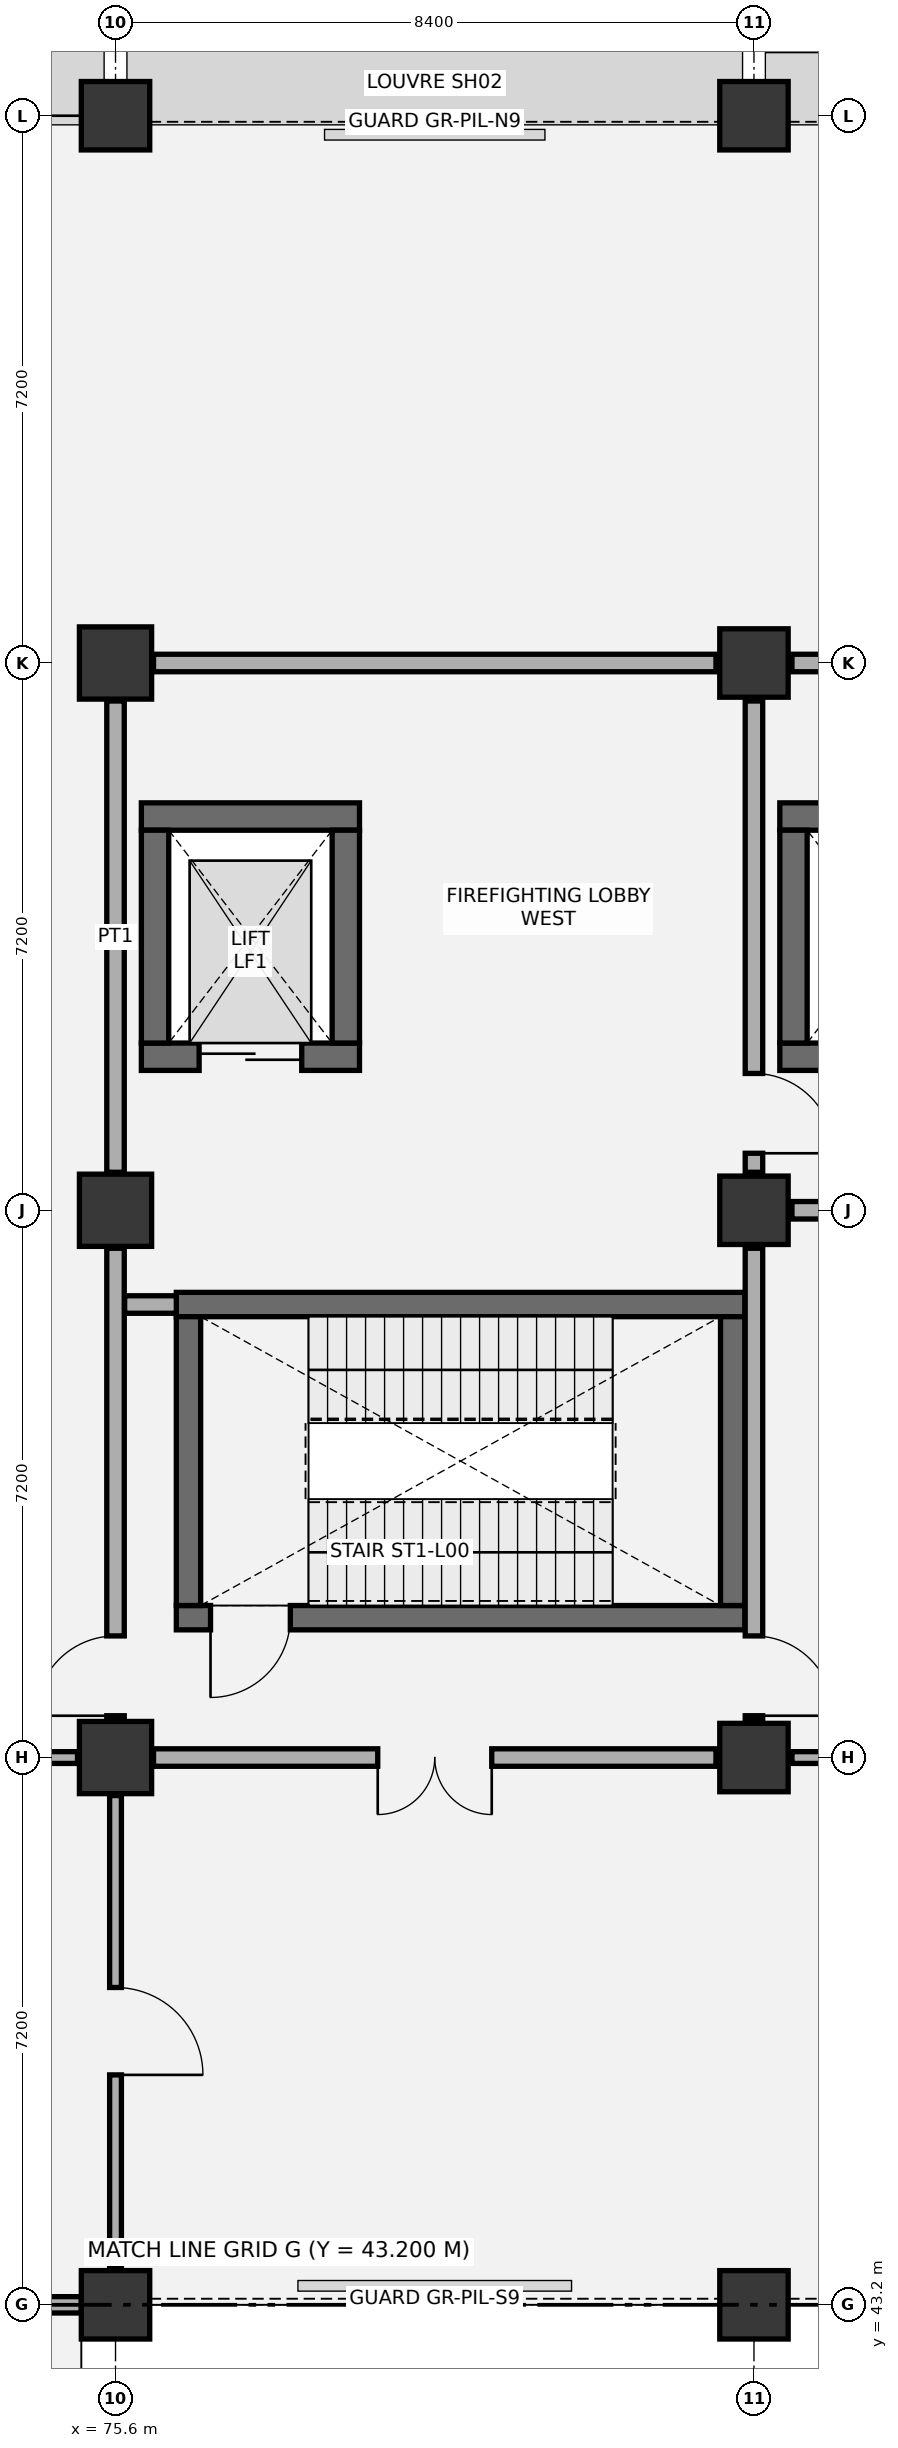
"""IFC4 building model, lengths in metres.
Left out: names, types, materials, properties, quantities, classifications, styles, units other than length and angle.
Written with IfcOpenShell. Run it as: python <this file> out.ifc"""

import sys

from ifc_helpers import new_model, si_unit, direction, frame, frame_2d, origin, origin_2d, place, context, subcontext, project, spatial, rectangle, circle, extrude, element, fill, save


model = new_model("IFC4")
c1 = context("Model", 3, precision=1e-05, world=origin(), true_north=direction((0.0, 1.0)))
c2 = subcontext(c1, "Body", "Model", "MODEL_VIEW")
j1 = project(units=[si_unit("LENGTHUNIT", "METRE"), si_unit("PLANEANGLEUNIT", "RADIAN")], contexts=[c1])
p1 = place(None, origin())
s1 = spatial("IfcSite", under=j1, at=p1, CompositionType="ELEMENT")
p2 = place(p1, origin())
s2 = spatial("IfcBuilding", under=s1, at=p2, CompositionType="ELEMENT")
p3 = place(p2, origin())
s3 = spatial("IfcBuildingStorey", under=s2, at=p3, CompositionType="ELEMENT", Elevation=0.0)
p4 = place(p3, frame((75.6, 43.2, 0.0), z_axis=(0.0, 0.0, 1.0), x_axis=(1.0, 0.0, 0.0)))
e1 = element("IfcColumn", 1, at=p4, inside=s3, PredefinedType="COLUMN", context=c2, shape_type="SweptSolid", body=[
    extrude(circle(Radius=0.45, at=origin_2d()), origin(), (0.0, 0.0, 1.0), 6.0),
])
for number, where, z_axis, x_axis in (
    (2, (75.6, 50.4, 0.0), (0.0, 0.0, 1.0), (1.0, 0.0, 0.0)),
    (3, (75.6, 57.6, 0.0), (0.0, 0.0, 1.0), (1.0, 0.0, 0.0)),
    (4, (75.6, 64.8, 0.0), (0.0, 0.0, 1.0), (1.0, 0.0, 0.0)),
):
    element("IfcColumn", number, at=place(p3, frame(where, z_axis=z_axis, x_axis=x_axis)), inside=s3, PredefinedType="COLUMN", context=c2, shape_type="SweptSolid", body=[
        extrude(rectangle(XDim=0.95, YDim=0.95, at=origin_2d()), origin(), (0.0, 0.0, 1.0), 6.0),
    ])
for number, where, z_axis, x_axis in (
    (5, (75.6, 72.0, 0.0), (0.0, 0.0, 1.0), (1.0, 0.0, 0.0)),
    (6, (84.0, 43.2, 0.0), (0.0, 0.0, 1.0), (1.0, 0.0, 0.0)),
):
    element("IfcColumn", number, at=place(p3, frame(where, z_axis=z_axis, x_axis=x_axis)), inside=s3, PredefinedType="COLUMN", context=c2, shape_type="SweptSolid", body=[
        extrude(circle(Radius=0.45, at=origin_2d()), origin(), (0.0, 0.0, 1.0), 6.0),
    ])
for number, where, z_axis, x_axis in (
    (7, (84.0, 50.4, 0.0), (0.0, 0.0, 1.0), (1.0, 0.0, 0.0)),
    (8, (84.0, 57.6, 0.0), (0.0, 0.0, 1.0), (1.0, 0.0, 0.0)),
    (9, (84.0, 64.8, 0.0), (0.0, 0.0, 1.0), (1.0, 0.0, 0.0)),
):
    element("IfcColumn", number, at=place(p3, frame(where, z_axis=z_axis, x_axis=x_axis)), inside=s3, PredefinedType="COLUMN", context=c2, shape_type="SweptSolid", body=[
        extrude(rectangle(XDim=0.9, YDim=0.9, at=origin_2d()), origin(), (0.0, 0.0, 1.0), 6.0),
    ])
p5 = place(p3, frame((84.0, 72.0, 0.0), z_axis=(0.0, 0.0, 1.0), x_axis=(1.0, 0.0, 0.0)))
e10 = element("IfcColumn", 10, at=p5, inside=s3, PredefinedType="COLUMN", context=c2, shape_type="SweptSolid", body=[
    extrude(circle(Radius=0.45, at=origin_2d()), origin(), (0.0, 0.0, 1.0), 6.0),
])
p6 = place(p3, frame((76.4, 52.24, 0.0), z_axis=(0.0, 0.0, 1.0), x_axis=(1.0, 0.0, 0.0)))
e11 = element("IfcWall", 11, at=p6, inside=s3, PredefinedType="SHEAR", context=c2, shape_type="SweptSolid", body=[
    extrude(rectangle(XDim=7.48, YDim=0.32, at=frame_2d((3.74, 0.0))), origin(), (0.0, 0.0, 1.0), 5.675),
])
p7 = place(p6, frame((0.45, 0.0, 0.0)))
e12 = element("IfcOpeningElement", 12, at=p7, cuts=e11, PredefinedType="OPENING", context=c2, shape_type="SweptSolid", body=[
    extrude(rectangle(XDim=1.05, YDim=2.15, at=frame_2d((0.525, 1.075))), frame((0.0, 0.17, 0.0), z_axis=(0.0, -1.0, 0.0), x_axis=(1.0, 0.0, 0.0)), (0.0, 0.0, 1.0), 0.34),
])
p8 = place(p3, frame((76.4, 56.36, 0.0), z_axis=(0.0, 0.0, 1.0), x_axis=(1.0, 0.0, 0.0)))
e13 = element("IfcWall", 13, at=p8, inside=s3, PredefinedType="SHEAR", context=c2, shape_type="SweptSolid", body=[
    extrude(rectangle(XDim=7.48, YDim=0.32, at=frame_2d((3.74, 0.0))), origin(), (0.0, 0.0, 1.0), 5.675),
])
for number, where, z_axis, x_axis in (
    (14, (76.56, 52.4, 0.0), (0.0, 0.0, 1.0), (0.0, 1.0, 0.0)),
    (15, (83.72, 52.4, 0.0), (0.0, 0.0, 1.0), (0.0, 1.0, 0.0)),
):
    element("IfcWall", number, at=place(p3, frame(where, z_axis=z_axis, x_axis=x_axis)), inside=s3, PredefinedType="SHEAR", context=c2, shape_type="SweptSolid", body=[
        extrude(rectangle(XDim=3.8, YDim=0.32, at=frame_2d((1.9, 0.0))), origin(), (0.0, 0.0, 1.0), 5.675),
    ])
p9 = place(p3, frame((75.94, 62.78, 0.0), z_axis=(0.0, 0.0, 1.0), x_axis=(1.0, 0.0, 0.0)))
e16 = element("IfcWall", 16, at=p9, inside=s3, PredefinedType="SHEAR", context=c2, shape_type="SweptSolid", body=[
    extrude(rectangle(XDim=2.87, YDim=0.36, at=frame_2d((1.435, 0.0))), origin(), (0.0, 0.0, 1.0), 5.675),
])
p10 = place(p3, frame((75.94, 59.62, 0.0), z_axis=(0.0, 0.0, 1.0), x_axis=(1.0, 0.0, 0.0)))
e17 = element("IfcWall", 17, at=p10, inside=s3, PredefinedType="SHEAR", context=c2, shape_type="SweptSolid", body=[
    extrude(rectangle(XDim=2.87, YDim=0.36, at=frame_2d((1.435, 0.0))), origin(), (0.0, 0.0, 1.0), 5.675),
])
p11 = place(p10, frame((0.76, 0.0, 0.0)))
e18 = element("IfcOpeningElement", 18, at=p11, cuts=e17, PredefinedType="OPENING", context=c2, shape_type="SweptSolid", body=[
    extrude(rectangle(XDim=1.35, YDim=2.2, at=frame_2d((0.675, 1.1))), frame((0.0, 0.19, 0.0), z_axis=(0.0, -1.0, 0.0), x_axis=(1.0, 0.0, 0.0)), (0.0, 0.0, 1.0), 0.38),
])
for number, where, z_axis, x_axis in (
    (19, (76.12, 59.8, 0.0), (0.0, 0.0, 1.0), (0.0, 1.0, 0.0)),
    (20, (78.63, 59.8, 0.0), (0.0, 0.0, 1.0), (0.0, 1.0, 0.0)),
):
    element("IfcWall", number, at=place(p3, frame(where, z_axis=z_axis, x_axis=x_axis)), inside=s3, PredefinedType="SHEAR", context=c2, shape_type="SweptSolid", body=[
        extrude(rectangle(XDim=2.8, YDim=0.36, at=frame_2d((1.4, 0.0))), origin(), (0.0, 0.0, 1.0), 5.675),
    ])
p12 = place(p3, frame((84.34, 62.78, 0.0), z_axis=(0.0, 0.0, 1.0), x_axis=(1.0, 0.0, 0.0)))
e21 = element("IfcWall", 21, at=p12, inside=s3, PredefinedType="SHEAR", context=c2, shape_type="SweptSolid", body=[
    extrude(rectangle(XDim=7.77, YDim=0.36, at=frame_2d((3.885, 0.0))), origin(), (0.0, 0.0, 1.0), 5.675),
])
p13 = place(p3, frame((84.34, 59.62, 0.0), z_axis=(0.0, 0.0, 1.0), x_axis=(1.0, 0.0, 0.0)))
e22 = element("IfcWall", 22, at=p13, inside=s3, PredefinedType="SHEAR", context=c2, shape_type="SweptSolid", body=[
    extrude(rectangle(XDim=2.66, YDim=0.36, at=frame_2d((1.33, 0.0))), origin(), (0.0, 0.0, 1.0), 5.675),
])
p14 = place(p13, frame((0.78, 0.0, 0.0)))
e23 = element("IfcOpeningElement", 23, at=p14, cuts=e22, PredefinedType="OPENING", context=c2, shape_type="SweptSolid", body=[
    extrude(rectangle(XDim=1.1, YDim=2.15, at=frame_2d((0.55, 1.075))), frame((0.0, 0.19, 0.0), z_axis=(0.0, -1.0, 0.0), x_axis=(1.0, 0.0, 0.0)), (0.0, 0.0, 1.0), 0.38),
])
p15 = place(p3, frame((84.52, 59.8, 0.0), z_axis=(0.0, 0.0, 1.0), x_axis=(0.0, 1.0, 0.0)))
e24 = element("IfcWall", 24, at=p15, inside=s3, PredefinedType="SHEAR", context=c2, shape_type="SweptSolid", body=[
    extrude(rectangle(XDim=2.8, YDim=0.36, at=frame_2d((1.4, 0.0))), origin(), (0.0, 0.0, 1.0), 5.675),
])
p16 = place(p3, frame((67.65, 43.2, 0.0), z_axis=(0.0, 0.0, 1.0), x_axis=(1.0, 0.0, 0.0)))
e25 = element("IfcWall", 25, at=p16, inside=s3, PredefinedType="SOLIDWALL", context=c2, shape_type="SweptSolid", body=[
    extrude(rectangle(XDim=7.5, YDim=0.215, at=frame_2d((3.75, 0.0))), origin(), (0.0, 0.0, 1.0), 5.02),
])
p17 = place(p16, frame((2.95, 0.0, 0.0)))
e26 = element("IfcOpeningElement", 26, at=p17, cuts=e25, PredefinedType="OPENING", context=c2, shape_type="SweptSolid", body=[
    extrude(rectangle(XDim=1.6, YDim=2.25, at=frame_2d((0.8, 1.125))), frame((0.0, 0.117, 0.0), z_axis=(0.0, -1.0, 0.0), x_axis=(1.0, 0.0, 0.0)), (0.0, 0.0, 1.0), 0.235),
])
p18 = place(p3, frame((75.6, 43.7, 0.0), z_axis=(0.0, 0.0, 1.0), x_axis=(0.0, 1.0, 0.0)))
e27 = element("IfcWall", 27, at=p18, inside=s3, PredefinedType="PARTITIONING", context=c2, shape_type="SweptSolid", body=[
    extrude(rectangle(XDim=6.2, YDim=0.155, at=frame_2d((3.1, 0.0))), origin(), (0.0, 0.0, 1.0), 4.92),
])
p19 = place(p18, frame((2.525, 0.0, 0.0)))
e28 = element("IfcOpeningElement", 28, at=p19, cuts=e27, PredefinedType="OPENING", context=c2, shape_type="SweptSolid", body=[
    extrude(rectangle(XDim=1.15, YDim=2.1, at=frame_2d((0.575, 1.05))), frame((0.0, 0.087, 0.0), z_axis=(0.0, -1.0, 0.0), x_axis=(1.0, 0.0, 0.0)), (0.0, 0.0, 1.0), 0.175),
])
p20 = place(p3, frame((67.7, 50.4, 0.0), z_axis=(0.0, 0.0, 1.0), x_axis=(1.0, 0.0, 0.0)))
e29 = element("IfcWall", 29, at=p20, inside=s3, PredefinedType="PARTITIONING", context=c2, shape_type="SweptSolid", body=[
    extrude(rectangle(XDim=7.4, YDim=0.155, at=frame_2d((3.7, 0.0))), origin(), (0.0, 0.0, 1.0), 4.87),
])
p21 = place(p20, frame((3.15, 0.0, 0.0)))
e30 = element("IfcOpeningElement", 30, at=p21, cuts=e29, PredefinedType="OPENING", context=c2, shape_type="SweptSolid", body=[
    extrude(rectangle(XDim=1.1, YDim=2.1, at=frame_2d((0.55, 1.05))), frame((0.0, 0.087, 0.0), z_axis=(0.0, -1.0, 0.0), x_axis=(1.0, 0.0, 0.0)), (0.0, 0.0, 1.0), 0.175),
])
p22 = place(p3, frame((75.6, 50.9, 0.0), z_axis=(0.0, 0.0, 1.0), x_axis=(0.0, 1.0, 0.0)))
e31 = element("IfcWall", 31, at=p22, inside=s3, PredefinedType="PARTITIONING", context=c2, shape_type="SweptSolid", body=[
    extrude(rectangle(XDim=6.2, YDim=0.23, at=frame_2d((3.1, 0.0))), origin(), (0.0, 0.0, 1.0), 5.17),
])
p23 = place(p22, frame((0.05, 0.0, 0.0)))
e32 = element("IfcOpeningElement", 32, at=p23, cuts=e31, PredefinedType="OPENING", context=c2, shape_type="SweptSolid", body=[
    extrude(rectangle(XDim=1.05, YDim=2.15, at=frame_2d((0.525, 1.075))), frame((0.0, 0.125, 0.0), z_axis=(0.0, -1.0, 0.0), x_axis=(1.0, 0.0, 0.0)), (0.0, 0.0, 1.0), 0.25),
])
p24 = place(p3, frame((75.6, 58.1, 0.0), z_axis=(0.0, 0.0, 1.0), x_axis=(0.0, 1.0, 0.0)))
e33 = element("IfcWall", 33, at=p24, inside=s3, PredefinedType="PARTITIONING", context=c2, shape_type="SweptSolid", body=[
    extrude(rectangle(XDim=6.2, YDim=0.23, at=frame_2d((3.1, 0.0))), origin(), (0.0, 0.0, 1.0), 4.92),
])
p25 = place(p3, frame((76.1, 50.4, 0.0), z_axis=(0.0, 0.0, 1.0), x_axis=(1.0, 0.0, 0.0)))
e34 = element("IfcWall", 34, at=p25, inside=s3, PredefinedType="PARTITIONING", context=c2, shape_type="SweptSolid", body=[
    extrude(rectangle(XDim=7.4, YDim=0.23, at=frame_2d((3.7, 0.0))), origin(), (0.0, 0.0, 1.0), 4.87),
])
p26 = place(p25, frame((2.95, 0.0, 0.0)))
e35 = element("IfcOpeningElement", 35, at=p26, cuts=e34, PredefinedType="OPENING", context=c2, shape_type="SweptSolid", body=[
    extrude(rectangle(XDim=1.5, YDim=2.15, at=frame_2d((0.75, 1.075))), frame((0.0, 0.125, 0.0), z_axis=(0.0, -1.0, 0.0), x_axis=(1.0, 0.0, 0.0)), (0.0, 0.0, 1.0), 0.25),
])
p27 = place(p3, frame((84.0, 50.9, 0.0), z_axis=(0.0, 0.0, 1.0), x_axis=(0.0, 1.0, 0.0)))
e36 = element("IfcWall", 36, at=p27, inside=s3, PredefinedType="PARTITIONING", context=c2, shape_type="SweptSolid", body=[
    extrude(rectangle(XDim=6.2, YDim=0.23, at=frame_2d((3.1, 0.0))), origin(), (0.0, 0.0, 1.0), 4.92),
])
p28 = place(p27, frame((0.05, 0.0, 0.0)))
e37 = element("IfcOpeningElement", 37, at=p28, cuts=e36, PredefinedType="OPENING", context=c2, shape_type="SweptSolid", body=[
    extrude(rectangle(XDim=1.05, YDim=2.15, at=frame_2d((0.525, 1.075))), frame((0.0, 0.125, 0.0), z_axis=(0.0, -1.0, 0.0), x_axis=(1.0, 0.0, 0.0)), (0.0, 0.0, 1.0), 0.25),
])
p29 = place(p3, frame((75.72, 56.36, 0.0), z_axis=(0.0, 0.0, 1.0), x_axis=(1.0, 0.0, 0.0)))
e38 = element("IfcWall", 38, at=p29, inside=s3, PredefinedType="PARTITIONING", context=c2, shape_type="SweptSolid", body=[
    extrude(rectangle(XDim=0.68, YDim=0.23, at=frame_2d((0.34, 0.0))), origin(), (0.0, 0.0, 1.0), 5.675),
])
p30 = place(p3, frame((84.0, 58.1, 0.0), z_axis=(0.0, 0.0, 1.0), x_axis=(0.0, 1.0, 0.0)))
e39 = element("IfcWall", 39, at=p30, inside=s3, PredefinedType="PARTITIONING", context=c2, shape_type="SweptSolid", body=[
    extrude(rectangle(XDim=6.2, YDim=0.23, at=frame_2d((3.1, 0.0))), origin(), (0.0, 0.0, 1.0), 5.27),
])
p31 = place(p30, frame((0.25, 0.0, 0.0)))
e40 = element("IfcOpeningElement", 40, at=p31, cuts=e39, PredefinedType="OPENING", context=c2, shape_type="SweptSolid", body=[
    extrude(rectangle(XDim=1.05, YDim=2.15, at=frame_2d((0.525, 1.075))), frame((0.0, 0.125, 0.0), z_axis=(0.0, -1.0, 0.0), x_axis=(1.0, 0.0, 0.0)), (0.0, 0.0, 1.0), 0.25),
])
p32 = place(p3, frame((76.1, 64.8, 0.0), z_axis=(0.0, 0.0, 1.0), x_axis=(1.0, 0.0, 0.0)))
e41 = element("IfcWall", 41, at=p32, inside=s3, PredefinedType="PARTITIONING", context=c2, shape_type="SweptSolid", body=[
    extrude(rectangle(XDim=7.4, YDim=0.23, at=frame_2d((3.7, 0.0))), origin(), (0.0, 0.0, 1.0), 4.87),
])
p33 = place(p3, frame((84.5, 50.4, 0.0), z_axis=(0.0, 0.0, 1.0), x_axis=(1.0, 0.0, 0.0)))
e42 = element("IfcWall", 42, at=p33, inside=s3, PredefinedType="PARTITIONING", context=c2, shape_type="SweptSolid", body=[
    extrude(rectangle(XDim=7.4, YDim=0.155, at=frame_2d((3.7, 0.0))), origin(), (0.0, 0.0, 1.0), 4.87),
])
p34 = place(p33, frame((3.125, 0.0, 0.0)))
e43 = element("IfcOpeningElement", 43, at=p34, cuts=e42, PredefinedType="OPENING", context=c2, shape_type="SweptSolid", body=[
    extrude(rectangle(XDim=1.15, YDim=2.1, at=frame_2d((0.575, 1.05))), frame((0.0, 0.087, 0.0), z_axis=(0.0, -1.0, 0.0), x_axis=(1.0, 0.0, 0.0)), (0.0, 0.0, 1.0), 0.175),
])
p35 = place(p3, frame((84.5, 57.6, 0.0), z_axis=(0.0, 0.0, 1.0), x_axis=(1.0, 0.0, 0.0)))
e44 = element("IfcWall", 44, at=p35, inside=s3, PredefinedType="PARTITIONING", context=c2, shape_type="SweptSolid", body=[
    extrude(rectangle(XDim=7.4, YDim=0.23, at=frame_2d((3.7, 0.0))), origin(), (0.0, 0.0, 1.0), 4.87),
])
p36 = place(p35, frame((2.95, 0.0, 0.0)))
e45 = element("IfcOpeningElement", 45, at=p36, cuts=e44, PredefinedType="OPENING", context=c2, shape_type="SweptSolid", body=[
    extrude(rectangle(XDim=1.5, YDim=2.15, at=frame_2d((0.75, 1.075))), frame((0.0, 0.125, 0.0), z_axis=(0.0, -1.0, 0.0), x_axis=(1.0, 0.0, 0.0)), (0.0, 0.0, 1.0), 0.25),
])
p37 = place(p3, frame((84.5, 64.8, 0.0), z_axis=(0.0, 0.0, 1.0), x_axis=(1.0, 0.0, 0.0)))
e46 = element("IfcWall", 46, at=p37, inside=s3, PredefinedType="PARTITIONING", context=c2, shape_type="SweptSolid", body=[
    extrude(rectangle(XDim=7.4, YDim=0.23, at=frame_2d((3.7, 0.0))), origin(), (0.0, 0.0, 1.0), 4.87),
])
p38 = place(p7, frame((1.05, 0.0, 0.0), z_axis=(0.0, 0.0, 1.0), x_axis=(-1.0, 0.0, 0.0)))
e47 = element("IfcDoor", 47, at=p38, inside=s3, OperationType="SINGLE_SWING_RIGHT", PredefinedType="DOOR", context=c2, shape_type="SweptSolid", body=[
    extrude(rectangle(XDim=1.05, YDim=2.15, at=frame_2d((0.525, 1.075))), frame((0.0, 0.025, 0.0), z_axis=(0.0, -1.0, 0.0), x_axis=(1.0, 0.0, 0.0)), (0.0, 0.0, 1.0), 0.05),
])
fill(e12, e47)
p39 = place(p11, origin())
e48 = element("IfcDoor", 48, at=p39, inside=s3, OperationType="DOUBLE_DOOR_SLIDING", PredefinedType="DOOR", context=c2, shape_type="SweptSolid", body=[
    extrude(rectangle(XDim=1.35, YDim=2.2, at=frame_2d((0.675, 1.1))), frame((0.0, 0.025, 0.0), z_axis=(0.0, -1.0, 0.0), x_axis=(1.0, 0.0, 0.0)), (0.0, 0.0, 1.0), 0.05),
])
fill(e18, e48)
p40 = place(p19, frame((1.15, 0.0, 0.0), z_axis=(0.0, 0.0, 1.0), x_axis=(-1.0, 0.0, 0.0)))
e49 = element("IfcDoor", 49, at=p40, inside=s3, OperationType="SINGLE_SWING_RIGHT", PredefinedType="DOOR", context=c2, shape_type="SweptSolid", body=[
    extrude(rectangle(XDim=1.15, YDim=2.1, at=frame_2d((0.575, 1.05))), frame((0.0, 0.025, 0.0), z_axis=(0.0, -1.0, 0.0), x_axis=(1.0, 0.0, 0.0)), (0.0, 0.0, 1.0), 0.05),
])
fill(e28, e49)
p41 = place(p23, origin())
e50 = element("IfcDoor", 50, at=p41, inside=s3, OperationType="SINGLE_SWING_LEFT", PredefinedType="DOOR", context=c2, shape_type="SweptSolid", body=[
    extrude(rectangle(XDim=1.05, YDim=2.15, at=frame_2d((0.525, 1.075))), frame((0.0, 0.025, 0.0), z_axis=(0.0, -1.0, 0.0), x_axis=(1.0, 0.0, 0.0)), (0.0, 0.0, 1.0), 0.05),
])
fill(e32, e50)
p42 = place(p26, frame((1.5, 0.0, 0.0), z_axis=(0.0, 0.0, 1.0), x_axis=(-1.0, 0.0, 0.0)))
e51 = element("IfcDoor", 51, at=p42, inside=s3, OperationType="DOUBLE_DOOR_SINGLE_SWING", PredefinedType="DOOR", context=c2, shape_type="SweptSolid", body=[
    extrude(rectangle(XDim=1.5, YDim=2.15, at=frame_2d((0.75, 1.075))), frame((0.0, 0.025, 0.0), z_axis=(0.0, -1.0, 0.0), x_axis=(1.0, 0.0, 0.0)), (0.0, 0.0, 1.0), 0.05),
])
fill(e35, e51)
p43 = place(p28, frame((1.05, 0.0, 0.0), z_axis=(0.0, 0.0, 1.0), x_axis=(-1.0, 0.0, 0.0)))
e52 = element("IfcDoor", 52, at=p43, inside=s3, OperationType="SINGLE_SWING_RIGHT", PredefinedType="DOOR", context=c2, shape_type="SweptSolid", body=[
    extrude(rectangle(XDim=1.05, YDim=2.15, at=frame_2d((0.525, 1.075))), frame((0.0, 0.025, 0.0), z_axis=(0.0, -1.0, 0.0), x_axis=(1.0, 0.0, 0.0)), (0.0, 0.0, 1.0), 0.05),
])
fill(e37, e52)
p44 = place(p31, frame((1.05, 0.0, 0.0), z_axis=(0.0, 0.0, 1.0), x_axis=(-1.0, 0.0, 0.0)))
e53 = element("IfcDoor", 53, at=p44, inside=s3, OperationType="SINGLE_SWING_RIGHT", PredefinedType="DOOR", context=c2, shape_type="SweptSolid", body=[
    extrude(rectangle(XDim=1.05, YDim=2.15, at=frame_2d((0.525, 1.075))), frame((0.0, 0.025, 0.0), z_axis=(0.0, -1.0, 0.0), x_axis=(1.0, 0.0, 0.0)), (0.0, 0.0, 1.0), 0.05),
])
fill(e40, e53)
save(model, sys.argv[1])
